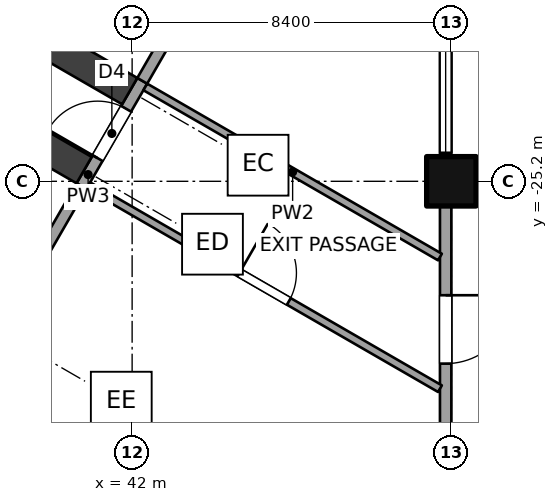
"""IFC4 building model, lengths in metres.
Left out: names, types, materials, properties, quantities, classifications, styles, units other than length and angle.
Written with IfcOpenShell. Run it as: python <this file> out.ifc"""

import sys

from ifc_helpers import new_model, si_unit, direction, frame, frame_2d, origin, origin_2d, place, context, subcontext, project, spatial, rectangle, extrude, element, fill, save


model = new_model("IFC4")
c1 = context("Model", 3, precision=1e-05, world=origin(), true_north=direction((0.0, 1.0)))
c2 = subcontext(c1, "Body", "Model", "MODEL_VIEW")
j1 = project(units=[si_unit("LENGTHUNIT", "METRE"), si_unit("PLANEANGLEUNIT", "RADIAN")], contexts=[c1])
p1 = place(None, origin())
s1 = spatial("IfcSite", under=j1, at=p1, CompositionType="ELEMENT")
p2 = place(p1, origin())
s2 = spatial("IfcBuilding", under=s1, at=p2, CompositionType="ELEMENT")
p3 = place(p2, origin())
s3 = spatial("IfcBuildingStorey", under=s2, at=p3, CompositionType="ELEMENT", Elevation=0.0)
p4 = place(p3, frame((50.4, -25.2, 0.0), z_axis=(0.0, 0.0, 1.0), x_axis=(1.0, 0.0, 0.0)))
e1 = element("IfcColumn", 1, at=p4, inside=s3, PredefinedType="COLUMN", context=c2, shape_type="SweptSolid", body=[
    extrude(rectangle(XDim=1.3, YDim=1.3, at=origin_2d()), origin(), (0.0, 0.0, 1.0), 6.0),
])
p5 = place(p3, frame((10.11, -4.451, 0.0), z_axis=(0.0, 0.0, 1.0), x_axis=(0.866025284237, -0.500000207062, 0.0)))
e2 = element("IfcWall", 2, at=p5, inside=s3, PredefinedType="SHEAR", context=c2, shape_type="SweptSolid", body=[
    extrude(rectangle(XDim=36.75, YDim=0.8, at=frame_2d((18.375, 0.0))), origin(), (0.0, 0.0, 1.0), 6.0),
])
p6 = place(p5, frame((2.85, 0.0, 0.0)))
e3 = element("IfcOpeningElement", 3, at=p6, cuts=e2, PredefinedType="OPENING", context=c2, shape_type="SweptSolid", body=[
    extrude(rectangle(XDim=1.2, YDim=2.1, at=frame_2d((0.6, 1.05))), frame((0.0, 0.41, 0.0), z_axis=(0.0, -1.0, 0.0), x_axis=(1.0, 0.0, 0.0)), (0.0, 0.0, 1.0), 0.82),
])
p7 = place(p3, frame((8.91, -6.53, 0.0), z_axis=(0.0, 0.0, 1.0), x_axis=(0.866025284237, -0.500000207062, 0.0)))
e4 = element("IfcWall", 4, at=p7, inside=s3, PredefinedType="SHEAR", context=c2, shape_type="SweptSolid", body=[
    extrude(rectangle(XDim=36.75, YDim=0.8, at=frame_2d((18.375, 0.0))), origin(), (0.0, 0.0, 1.0), 6.0),
])
p8 = place(p7, frame((10.0, 0.0, 0.0)))
e5 = element("IfcOpeningElement", 5, at=p8, cuts=e4, PredefinedType="OPENING", context=c2, shape_type="SweptSolid", body=[
    extrude(rectangle(XDim=1.0, YDim=2.1, at=frame_2d((0.5, 1.05))), frame((0.0, 0.41, 0.0), z_axis=(0.0, -1.0, 0.0), x_axis=(1.0, 0.0, 0.0)), (0.0, 0.0, 1.0), 0.82),
])
p9 = place(p7, frame((2.85, 0.0, 0.0)))
e6 = element("IfcOpeningElement", 6, at=p9, cuts=e4, PredefinedType="OPENING", context=c2, shape_type="SweptSolid", body=[
    extrude(rectangle(XDim=1.2, YDim=2.1, at=frame_2d((0.6, 1.05))), frame((0.0, 0.41, 0.0), z_axis=(0.0, -1.0, 0.0), x_axis=(1.0, 0.0, 0.0)), (0.0, 0.0, 1.0), 0.82),
])
p10 = place(p3, frame((50.25, 50.1, 0.0), z_axis=(0.0, 0.0, 1.0), x_axis=(0.0, -1.0, 0.0)))
e7 = element("IfcWall", 7, at=p10, inside=s3, PredefinedType="SOLIDWALL", context=c2, shape_type="SweptSolid", body=[
    extrude(rectangle(XDim=91.8, YDim=0.3, at=frame_2d((45.9, 0.0))), origin(), (0.0, 0.0, 1.0), 4.7),
])
p11 = place(p10, frame((10.188, 0.0, 0.0)))
e8 = element("IfcOpeningElement", 8, at=p11, cuts=e7, PredefinedType="OPENING", context=c2, shape_type="SweptSolid", body=[
    extrude(rectangle(XDim=1.2, YDim=2.4, at=frame_2d((0.6, 1.2))), frame((0.0, 0.16, 0.0), z_axis=(0.0, -1.0, 0.0), x_axis=(1.0, 0.0, 0.0)), (0.0, 0.0, 1.0), 0.32),
])
p12 = place(p10, frame((27.3, 0.0, 0.0)))
e9 = element("IfcOpeningElement", 9, at=p12, cuts=e7, PredefinedType="OPENING", context=c2, shape_type="SweptSolid", body=[
    extrude(rectangle(XDim=3.6, YDim=4.2, at=frame_2d((1.8, 2.1))), frame((0.0, 0.16, 0.0), z_axis=(0.0, -1.0, 0.0), x_axis=(1.0, 0.0, 0.0)), (0.0, 0.0, 1.0), 0.32),
])
p13 = place(p10, frame((36.6, 0.0, 0.0)))
e10 = element("IfcOpeningElement", 10, at=p13, cuts=e7, PredefinedType="OPENING", context=c2, shape_type="SweptSolid", body=[
    extrude(rectangle(XDim=1.8, YDim=2.4, at=frame_2d((0.9, 1.2))), frame((0.0, 0.16, 0.0), z_axis=(0.0, -1.0, 0.0), x_axis=(1.0, 0.0, 0.0)), (0.0, 0.0, 1.0), 0.32),
])
p14 = place(p10, frame((45.0, 0.0, 0.0)))
e11 = element("IfcOpeningElement", 11, at=p14, cuts=e7, PredefinedType="OPENING", context=c2, shape_type="SweptSolid", body=[
    extrude(rectangle(XDim=1.8, YDim=2.4, at=frame_2d((0.9, 1.2))), frame((0.0, 0.16, 0.0), z_axis=(0.0, -1.0, 0.0), x_axis=(1.0, 0.0, 0.0)), (0.0, 0.0, 1.0), 0.32),
])
p15 = place(p10, frame((59.7, 0.0, 0.0)))
e12 = element("IfcOpeningElement", 12, at=p15, cuts=e7, PredefinedType="OPENING", context=c2, shape_type="SweptSolid", body=[
    extrude(rectangle(XDim=6.0, YDim=3.0, at=frame_2d((3.0, 1.5))), frame((0.0, 0.16, 0.0), z_axis=(0.0, -1.0, 0.0), x_axis=(1.0, 0.0, 0.0)), (0.0, 0.0, 1.0), 0.32),
])
p16 = place(p10, frame((78.298, 0.0, 0.0)))
e13 = element("IfcOpeningElement", 13, at=p16, cuts=e7, PredefinedType="OPENING", context=c2, shape_type="SweptSolid", body=[
    extrude(rectangle(XDim=1.8, YDim=2.4, at=frame_2d((0.9, 1.2))), frame((0.0, 0.16, 0.0), z_axis=(0.0, -1.0, 0.0), x_axis=(1.0, 0.0, 0.0)), (0.0, 0.0, 1.0), 0.32),
])
p17 = place(p10, frame((87.0, 0.0, 0.0)))
e14 = element("IfcOpeningElement", 14, at=p17, cuts=e7, PredefinedType="OPENING", context=c2, shape_type="SweptSolid", body=[
    extrude(rectangle(XDim=1.8, YDim=2.4, at=frame_2d((0.9, 1.2))), frame((0.0, 0.16, 0.0), z_axis=(0.0, -1.0, 0.0), x_axis=(1.0, 0.0, 0.0)), (0.0, 0.0, 1.0), 0.32),
])
p18 = place(p10, frame((0.45, 0.0, 0.3)))
e15 = element("IfcOpeningElement", 15, at=p18, cuts=e7, PredefinedType="OPENING", context=c2, shape_type="SweptSolid", body=[
    extrude(rectangle(XDim=3.15, YDim=3.0, at=frame_2d((1.575, 1.5))), frame((0.0, 0.16, 0.0), z_axis=(0.0, -1.0, 0.0), x_axis=(1.0, 0.0, 0.0)), (0.0, 0.0, 1.0), 0.32),
])
p19 = place(p10, frame((4.2, 0.0, 0.3)))
e16 = element("IfcOpeningElement", 16, at=p19, cuts=e7, PredefinedType="OPENING", context=c2, shape_type="SweptSolid", body=[
    extrude(rectangle(XDim=3.15, YDim=3.0, at=frame_2d((1.575, 1.5))), frame((0.0, 0.16, 0.0), z_axis=(0.0, -1.0, 0.0), x_axis=(1.0, 0.0, 0.0)), (0.0, 0.0, 1.0), 0.32),
])
p20 = place(p10, frame((12.6, 0.0, 0.3)))
e17 = element("IfcOpeningElement", 17, at=p20, cuts=e7, PredefinedType="OPENING", context=c2, shape_type="SweptSolid", body=[
    extrude(rectangle(XDim=3.15, YDim=3.0, at=frame_2d((1.575, 1.5))), frame((0.0, 0.16, 0.0), z_axis=(0.0, -1.0, 0.0), x_axis=(1.0, 0.0, 0.0)), (0.0, 0.0, 1.0), 0.32),
])
p21 = place(p10, frame((17.25, 0.0, 0.3)))
e18 = element("IfcOpeningElement", 18, at=p21, cuts=e7, PredefinedType="OPENING", context=c2, shape_type="SweptSolid", body=[
    extrude(rectangle(XDim=3.15, YDim=3.0, at=frame_2d((1.575, 1.5))), frame((0.0, 0.16, 0.0), z_axis=(0.0, -1.0, 0.0), x_axis=(1.0, 0.0, 0.0)), (0.0, 0.0, 1.0), 0.32),
])
p22 = place(p10, frame((21.0, 0.0, 0.3)))
e19 = element("IfcOpeningElement", 19, at=p22, cuts=e7, PredefinedType="OPENING", context=c2, shape_type="SweptSolid", body=[
    extrude(rectangle(XDim=3.15, YDim=3.0, at=frame_2d((1.575, 1.5))), frame((0.0, 0.16, 0.0), z_axis=(0.0, -1.0, 0.0), x_axis=(1.0, 0.0, 0.0)), (0.0, 0.0, 1.0), 0.32),
])
p23 = place(p10, frame((50.85, 0.0, 0.3)))
e20 = element("IfcOpeningElement", 20, at=p23, cuts=e7, PredefinedType="OPENING", context=c2, shape_type="SweptSolid", body=[
    extrude(rectangle(XDim=3.15, YDim=3.0, at=frame_2d((1.575, 1.5))), frame((0.0, 0.16, 0.0), z_axis=(0.0, -1.0, 0.0), x_axis=(1.0, 0.0, 0.0)), (0.0, 0.0, 1.0), 0.32),
])
p24 = place(p10, frame((54.6, 0.0, 0.3)))
e21 = element("IfcOpeningElement", 21, at=p24, cuts=e7, PredefinedType="OPENING", context=c2, shape_type="SweptSolid", body=[
    extrude(rectangle(XDim=3.15, YDim=3.0, at=frame_2d((1.575, 1.5))), frame((0.0, 0.16, 0.0), z_axis=(0.0, -1.0, 0.0), x_axis=(1.0, 0.0, 0.0)), (0.0, 0.0, 1.0), 0.32),
])
p25 = place(p10, frame((67.65, 0.0, 0.3)))
e22 = element("IfcOpeningElement", 22, at=p25, cuts=e7, PredefinedType="OPENING", context=c2, shape_type="SweptSolid", body=[
    extrude(rectangle(XDim=3.15, YDim=3.0, at=frame_2d((1.575, 1.5))), frame((0.0, 0.16, 0.0), z_axis=(0.0, -1.0, 0.0), x_axis=(1.0, 0.0, 0.0)), (0.0, 0.0, 1.0), 0.32),
])
p26 = place(p10, frame((71.4, 0.0, 0.3)))
e23 = element("IfcOpeningElement", 23, at=p26, cuts=e7, PredefinedType="OPENING", context=c2, shape_type="SweptSolid", body=[
    extrude(rectangle(XDim=3.15, YDim=3.0, at=frame_2d((1.575, 1.5))), frame((0.0, 0.16, 0.0), z_axis=(0.0, -1.0, 0.0), x_axis=(1.0, 0.0, 0.0)), (0.0, 0.0, 1.0), 0.32),
])
p27 = place(p3, frame((40.667, -25.326, 0.0), z_axis=(0.0, 0.0, 1.0), x_axis=(0.499971222258, 0.866042017984, 0.0)))
e24 = element("IfcWall", 24, at=p27, inside=s3, PredefinedType="SOLIDWALL", context=c2, shape_type="SweptSolid", body=[
    extrude(rectangle(XDim=3.2, YDim=0.3, at=frame_2d((1.6, 0.0))), origin(), (0.0, 0.0, 1.0), 5.7),
])
p28 = place(p27, frame((0.85, 0.0, 0.0)))
e25 = element("IfcOpeningElement", 25, at=p28, cuts=e24, PredefinedType="OPENING", context=c2, shape_type="SweptSolid", body=[
    extrude(rectangle(XDim=1.5, YDim=2.1, at=frame_2d((0.75, 1.05))), frame((0.0, 0.16, 0.0), z_axis=(0.0, -1.0, 0.0), x_axis=(1.0, 0.0, 0.0)), (0.0, 0.0, 1.0), 0.32),
])
p29 = place(p3, frame((42.346, -22.717, 0.0), z_axis=(0.0, 0.0, 1.0), x_axis=(0.866038004836, -0.499978173704, 0.0)))
e26 = element("IfcWall", 26, at=p29, inside=s3, PredefinedType="SOLIDWALL", context=c2, shape_type="SweptSolid", body=[
    extrude(rectangle(XDim=8.953, YDim=0.2, at=frame_2d((4.477, 0.0))), origin(), (0.0, 0.0, 1.0), 5.7),
])
p30 = place(p3, frame((40.846, -25.315, 0.0), z_axis=(0.0, 0.0, 1.0), x_axis=(0.866028443642, -0.499994734776, 0.0)))
e27 = element("IfcWall", 27, at=p30, inside=s3, PredefinedType="SOLIDWALL", context=c2, shape_type="SweptSolid", body=[
    extrude(rectangle(XDim=10.685, YDim=0.2, at=frame_2d((5.343, 0.0))), origin(), (0.0, 0.0, 1.0), 5.7),
])
p31 = place(p30, frame((4.593, 0.0, 0.0)))
e28 = element("IfcOpeningElement", 28, at=p31, cuts=e27, PredefinedType="OPENING", context=c2, shape_type="SweptSolid", body=[
    extrude(rectangle(XDim=1.5, YDim=2.1, at=frame_2d((0.75, 1.05))), frame((0.0, 0.11, 0.0), z_axis=(0.0, -1.0, 0.0), x_axis=(1.0, 0.0, 0.0)), (0.0, 0.0, 1.0), 0.22),
])
for number, where, z_axis, x_axis in (
    (29, (42.267, -22.555, 0.0), (0.0, 0.0, 1.0), (0.5, 0.866, 0.0)),
    (30, (40.667, -25.326, 0.0), (0.0, 0.0, 1.0), (-0.5, -0.866, 0.0)),
):
    element("IfcWall", number, at=place(p3, frame(where, z_axis=z_axis, x_axis=x_axis)), inside=s3, PredefinedType="SOLIDWALL", context=c2, shape_type="SweptSolid", body=[
        extrude(rectangle(XDim=8.6, YDim=0.3, at=frame_2d((4.3, 0.0))), origin(), (0.0, 0.0, 1.0), 4.1),
    ])
p32 = place(p16, origin())
e31 = element("IfcDoor", 31, at=p32, inside=s3, OperationType="DOUBLE_DOOR_DOUBLE_SWING", PredefinedType="DOOR", context=c2, shape_type="SweptSolid", body=[
    extrude(rectangle(XDim=1.8, YDim=2.4, at=frame_2d((0.9, 1.2))), frame((0.0, 0.025, 0.0), z_axis=(0.0, -1.0, 0.0), x_axis=(1.0, 0.0, 0.0)), (0.0, 0.0, 1.0), 0.05),
])
fill(e13, e31)
p33 = place(p26, origin())
e32 = element("IfcWindow", 32, at=p33, inside=s3, PartitioningType="SINGLE_PANEL", PredefinedType="WINDOW", context=c2, shape_type="SweptSolid", body=[
    extrude(rectangle(XDim=3.15, YDim=3.0, at=frame_2d((1.575, 1.5))), frame((0.0, 0.03, 0.0), z_axis=(0.0, -1.0, 0.0), x_axis=(1.0, 0.0, 0.0)), (0.0, 0.0, 1.0), 0.06),
])
fill(e23, e32)
p34 = place(p28, origin())
e33 = element("IfcDoor", 33, at=p34, inside=s3, OperationType="DOUBLE_DOOR_DOUBLE_SWING", PredefinedType="DOOR", context=c2, shape_type="SweptSolid", body=[
    extrude(rectangle(XDim=1.5, YDim=2.1, at=frame_2d((0.75, 1.05))), frame((0.0, 0.025, 0.0), z_axis=(0.0, -1.0, 0.0), x_axis=(1.0, 0.0, 0.0)), (0.0, 0.0, 1.0), 0.05),
])
fill(e25, e33)
p35 = place(p31, origin())
e34 = element("IfcDoor", 34, at=p35, inside=s3, OperationType="DOUBLE_DOOR_DOUBLE_SWING", PredefinedType="DOOR", context=c2, shape_type="SweptSolid", body=[
    extrude(rectangle(XDim=1.5, YDim=2.1, at=frame_2d((0.75, 1.05))), frame((0.0, 0.025, 0.0), z_axis=(0.0, -1.0, 0.0), x_axis=(1.0, 0.0, 0.0)), (0.0, 0.0, 1.0), 0.05),
])
fill(e28, e34)
save(model, sys.argv[1])
